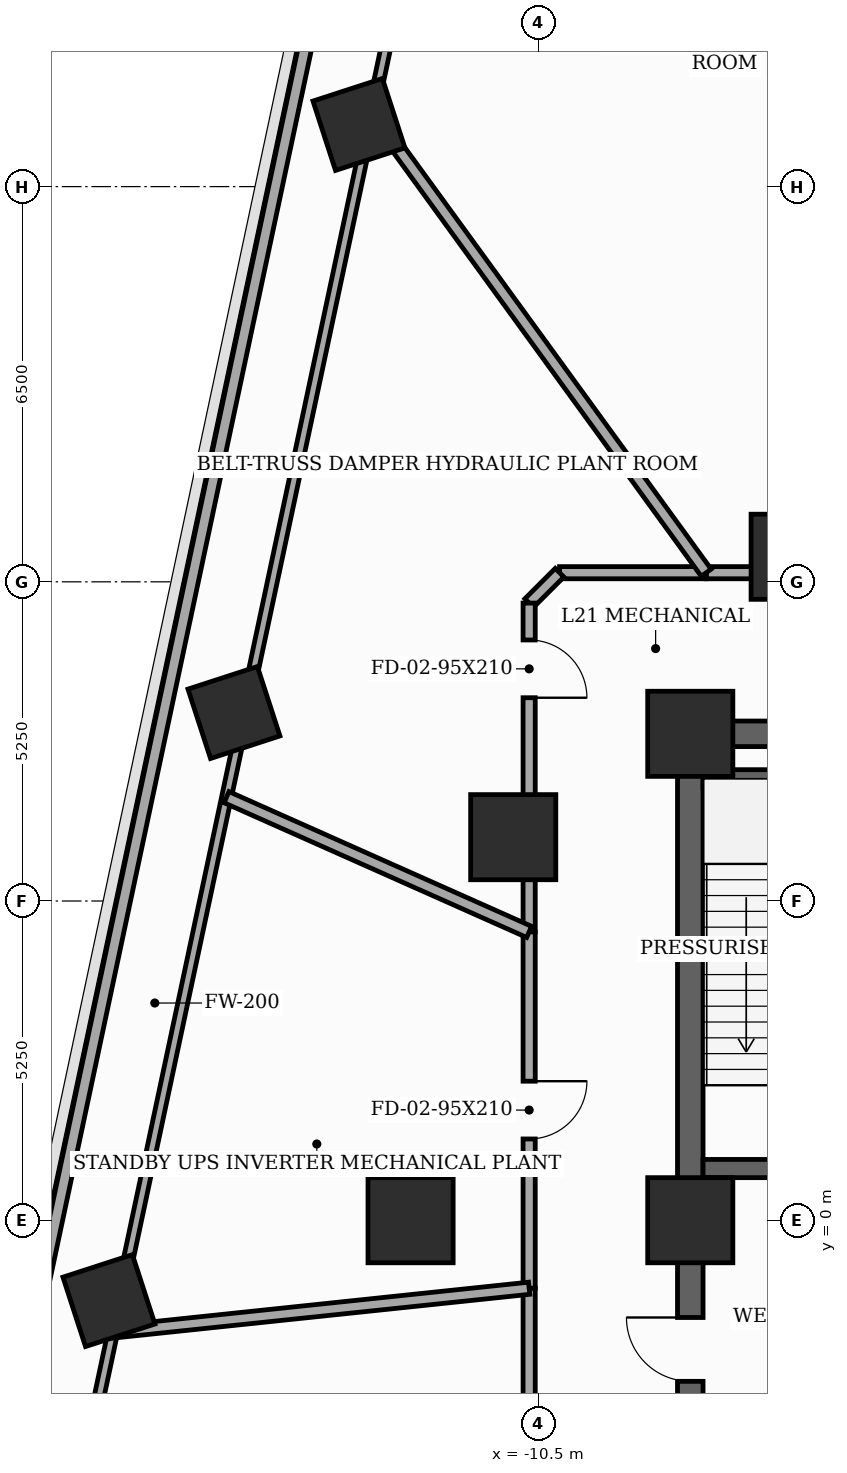
"""IFC4 building model, lengths in metres.
Left out: names, types, materials, properties, quantities, classifications, styles, units other than length and angle.
Written with IfcOpenShell. Run it as: python <this file> out.ifc"""

import sys

from ifc_helpers import new_model, si_unit, direction, frame, frame_2d, origin, origin_2d, place, context, subcontext, project, spatial, rectangle, extrude, element, fill, save


model = new_model("IFC4")
c1 = context("Model", 3, precision=1e-05, world=origin(), true_north=direction((0.0, 1.0)))
c2 = subcontext(c1, "Body", "Model", "MODEL_VIEW")
j1 = project(units=[si_unit("LENGTHUNIT", "METRE"), si_unit("PLANEANGLEUNIT", "RADIAN")], contexts=[c1])
p1 = place(None, origin())
s1 = spatial("IfcSite", under=j1, at=p1, CompositionType="ELEMENT")
p2 = place(p1, origin())
s2 = spatial("IfcBuilding", under=s1, at=p2, CompositionType="ELEMENT")
p3 = place(p2, frame((0.0, 0.0, 85.2)))
s3 = spatial("IfcBuildingStorey", under=s2, at=p3, CompositionType="ELEMENT", Elevation=85.2)
for number, where, z_axis, x_axis in (
    (1, (-8.0, 8.0, 0.0), (0.0, 0.0, 1.0), (1.0, 0.0, 0.0)),
    (2, (-8.0, 0.0, 0.0), (0.0, 0.0, 1.0), (1.0, 0.0, 0.0)),
    (3, (-6.3, 10.912, 0.0), (0.0, 0.0, 1.0), (1.0, 0.0, 0.0)),
    (4, (-10.912, 6.3, 0.0), (0.0, 0.0, 1.0), (1.0, 0.0, 0.0)),
    (5, (-12.6, 0.0, 0.0), (0.0, 0.0, 1.0), (1.0, 0.0, 0.0)),
):
    element("IfcColumn", number, at=place(p3, frame(where, z_axis=z_axis, x_axis=x_axis)), inside=s3, PredefinedType="COLUMN", context=c2, shape_type="SweptSolid", body=[
        extrude(rectangle(XDim=1.4, YDim=1.4, at=origin_2d()), origin(), (0.0, 0.0, 1.0), 5.1),
    ])
for number, where, z_axis, x_axis in (
    (6, (-13.449, 18.022, 0.0), (0.0, 0.0, 1.0), (0.951, 0.309, 0.0)),
    (7, (-15.505, 8.35, 0.0), (0.0, 0.0, 1.0), (0.951, 0.309, 0.0)),
    (8, (-17.561, -1.322, 0.0), (0.0, 0.0, 1.0), (0.951, 0.309, 0.0)),
):
    element("IfcColumn", number, at=place(p3, frame(where, z_axis=z_axis, x_axis=x_axis)), inside=s3, PredefinedType="COLUMN", context=c2, shape_type="SweptSolid", body=[
        extrude(rectangle(XDim=1.2, YDim=1.2, at=origin_2d()), origin(), (0.0, 0.0, 1.0), 5.1),
    ])
p4 = place(p3, frame((-12.499, 27.929, 0.0), z_axis=(0.0, 0.0, 1.0), x_axis=(-0.207909723978, -0.978148018796, 0.0)))
e9 = element("IfcWall", 9, at=p4, inside=s3, PredefinedType="SOLIDWALL", context=c2, shape_type="SweptSolid", body=[
    extrude(rectangle(XDim=49.44, YDim=0.22, at=frame_2d((24.72, 0.0))), origin(), (0.0, 0.0, 1.0), 4.4),
])
p5 = place(p3, frame((-8.0, -8.0, 0.0), z_axis=(0.0, 0.0, 1.0), x_axis=(0.0, 1.0, 0.0)))
e10 = element("IfcWall", 10, at=p5, inside=s3, PredefinedType="SHEAR", context=c2, shape_type="SweptSolid", body=[
    extrude(rectangle(XDim=16.0, YDim=0.42, at=frame_2d((8.0, 0.0))), origin(), (0.0, 0.0, 1.0), 4.9),
])
p6 = place(p5, frame((0.922, 0.0, 0.0)))
e11 = element("IfcOpeningElement", 11, at=p6, cuts=e10, PredefinedType="OPENING", context=c2, shape_type="SweptSolid", body=[
    extrude(rectangle(XDim=0.85, YDim=2.02, at=frame_2d((0.425, 1.01))), frame((0.0, 0.22, 0.0), z_axis=(0.0, -1.0, 0.0), x_axis=(1.0, 0.0, 0.0)), (0.0, 0.0, 1.0), 0.44),
])
p7 = place(p5, frame((5.35, 0.0, 0.0)))
e12 = element("IfcOpeningElement", 12, at=p7, cuts=e10, PredefinedType="OPENING", context=c2, shape_type="SweptSolid", body=[
    extrude(rectangle(XDim=1.05, YDim=2.15, at=frame_2d((0.525, 1.075))), frame((0.0, 0.22, 0.0), z_axis=(0.0, -1.0, 0.0), x_axis=(1.0, 0.0, 0.0)), (0.0, 0.0, 1.0), 0.44),
])
p8 = place(p3, frame((-8.0, 8.0, 0.0), z_axis=(0.0, 0.0, 1.0), x_axis=(1.0, 0.0, 0.0)))
e13 = element("IfcWall", 13, at=p8, inside=s3, PredefinedType="SHEAR", context=c2, shape_type="SweptSolid", body=[
    extrude(rectangle(XDim=16.0, YDim=0.42, at=frame_2d((8.0, 0.0))), origin(), (0.0, 0.0, 1.0), 4.9),
])
p9 = place(p8, frame((7.1, 0.0, 0.0)))
e14 = element("IfcOpeningElement", 14, at=p9, cuts=e13, PredefinedType="OPENING", context=c2, shape_type="SweptSolid", body=[
    extrude(rectangle(XDim=1.8, YDim=2.15, at=frame_2d((0.9, 1.075))), frame((0.0, 0.22, 0.0), z_axis=(0.0, -1.0, 0.0), x_axis=(1.0, 0.0, 0.0)), (0.0, 0.0, 1.0), 0.44),
])
p10 = place(p3, frame((-7.79, 0.85, 0.0), z_axis=(0.0, 0.0, 1.0), x_axis=(1.0, 0.0, 0.0)))
e15 = element("IfcWall", 15, at=p10, inside=s3, PredefinedType="SHEAR", context=c2, shape_type="SweptSolid", body=[
    extrude(rectangle(XDim=3.34, YDim=0.3, at=frame_2d((1.67, 0.0))), origin(), (0.0, 0.0, 1.0), 4.9),
])
p11 = place(p10, frame((1.85, 0.0, 0.0)))
e16 = element("IfcOpeningElement", 16, at=p11, cuts=e15, PredefinedType="OPENING", context=c2, shape_type="SweptSolid", body=[
    extrude(rectangle(XDim=1.05, YDim=2.15, at=frame_2d((0.525, 1.075))), frame((0.0, 0.16, 0.0), z_axis=(0.0, -1.0, 0.0), x_axis=(1.0, 0.0, 0.0)), (0.0, 0.0, 1.0), 0.32),
])
p12 = place(p3, frame((-7.79, 7.26, 0.0), z_axis=(0.0, 0.0, 1.0), x_axis=(1.0, 0.0, 0.0)))
e17 = element("IfcWall", 17, at=p12, inside=s3, PredefinedType="SHEAR", context=c2, shape_type="SweptSolid", body=[
    extrude(rectangle(XDim=3.34, YDim=0.3, at=frame_2d((1.67, 0.0))), origin(), (0.0, 0.0, 1.0), 4.9),
])
p13 = place(p3, frame((-21.467, -20.518, 0.0), z_axis=(0.0, 0.0, 1.0), x_axis=(0.207911659575, 0.978147607375, 0.0)))
e18 = element("IfcWall", 18, at=p13, inside=s3, PredefinedType="SOLIDWALL", context=c2, shape_type="SweptSolid", body=[
    extrude(rectangle(XDim=49.066, YDim=0.16, at=frame_2d((24.533, 0.0))), origin(), (0.0, 0.0, 1.0), 3.485),
])
p14 = place(p3, frame((-7.036, 28.85, 0.0), z_axis=(0.0, 0.0, 1.0), x_axis=(0.743144937383, -0.669130482075, 0.0)))
e19 = element("IfcWall", 19, at=p14, inside=s3, PredefinedType="SOLIDWALL", context=c2, shape_type="SweptSolid", body=[
    extrude(rectangle(XDim=49.066, YDim=0.16, at=frame_2d((24.533, 0.0))), origin(), (0.0, 0.0, 1.0), 3.485),
])
p15 = place(p3, frame((-10.65, -1.119, 0.0), z_axis=(0.0, 0.0, 1.0), x_axis=(0.0, -1.0, 0.0)))
e20 = element("IfcWall", 20, at=p15, inside=s3, PredefinedType="SOLIDWALL", context=c2, shape_type="SweptSolid", body=[
    extrude(rectangle(XDim=6.619, YDim=0.2, at=frame_2d((3.31, 0.0))), origin(), (0.0, 0.0, 1.0), 4.285),
])
p16 = place(p15, frame((2.04, 0.0, 0.0)))
e21 = element("IfcOpeningElement", 21, at=p16, cuts=e20, PredefinedType="OPENING", context=c2, shape_type="SweptSolid", body=[
    extrude(rectangle(XDim=0.95, YDim=2.1, at=frame_2d((0.475, 1.05))), frame((0.0, 0.11, 0.0), z_axis=(0.0, -1.0, 0.0), x_axis=(1.0, 0.0, 0.0)), (0.0, 0.0, 1.0), 0.22),
])
p17 = place(p3, frame((-1.119, 10.65, 0.0), z_axis=(0.0, 0.0, 1.0), x_axis=(-1.0, 0.0, 0.0)))
e22 = element("IfcWall", 22, at=p17, inside=s3, PredefinedType="SOLIDWALL", context=c2, shape_type="SweptSolid", body=[
    extrude(rectangle(XDim=6.619, YDim=0.2, at=frame_2d((3.31, 0.0))), origin(), (0.0, 0.0, 1.0), 3.485),
])
p18 = place(p17, frame((2.04, 0.0, 0.0)))
e23 = element("IfcOpeningElement", 23, at=p18, cuts=e22, PredefinedType="OPENING", context=c2, shape_type="SweptSolid", body=[
    extrude(rectangle(XDim=0.95, YDim=2.1, at=frame_2d((0.475, 1.05))), frame((0.0, 0.11, 0.0), z_axis=(0.0, -1.0, 0.0), x_axis=(1.0, 0.0, 0.0)), (0.0, 0.0, 1.0), 0.22),
])
p19 = place(p3, frame((-7.738, 10.65, 0.0), z_axis=(0.0, 0.0, 1.0), x_axis=(-1.0, 0.0, 0.0)))
e24 = element("IfcWall", 24, at=p19, inside=s3, PredefinedType="SOLIDWALL", context=c2, shape_type="SweptSolid", body=[
    extrude(rectangle(XDim=2.412, YDim=0.2, at=frame_2d((1.206, 0.0))), origin(), (0.0, 0.0, 1.0), 4.9),
])
p20 = place(p3, frame((-10.15, 10.65, 0.0), z_axis=(0.0, 0.0, 1.0), x_axis=(-0.707106781187, -0.707106781187, 0.0)))
e25 = element("IfcWall", 25, at=p20, inside=s3, PredefinedType="SOLIDWALL", context=c2, shape_type="SweptSolid", body=[
    extrude(rectangle(XDim=0.707, YDim=0.2, at=frame_2d((0.354, 0.0))), origin(), (0.0, 0.0, 1.0), 4.9),
])
p21 = place(p3, frame((-10.65, 10.15, 0.0), z_axis=(0.0, 0.0, 1.0), x_axis=(0.0, -1.0, 0.0)))
e26 = element("IfcWall", 26, at=p21, inside=s3, PredefinedType="SOLIDWALL", context=c2, shape_type="SweptSolid", body=[
    extrude(rectangle(XDim=5.408, YDim=0.2, at=frame_2d((2.704, 0.0))), origin(), (0.0, 0.0, 1.0), 4.285),
])
p22 = place(p21, frame((0.607, 0.0, 0.0)))
e27 = element("IfcOpeningElement", 27, at=p22, cuts=e26, PredefinedType="OPENING", context=c2, shape_type="SweptSolid", body=[
    extrude(rectangle(XDim=0.95, YDim=2.1, at=frame_2d((0.475, 1.05))), frame((0.0, 0.11, 0.0), z_axis=(0.0, -1.0, 0.0), x_axis=(1.0, 0.0, 0.0)), (0.0, 0.0, 1.0), 0.22),
])
p23 = place(p3, frame((-10.65, 4.742, 0.0), z_axis=(0.0, 0.0, 1.0), x_axis=(0.0, -1.0, 0.0)))
e28 = element("IfcWall", 28, at=p23, inside=s3, PredefinedType="SOLIDWALL", context=c2, shape_type="SweptSolid", body=[
    extrude(rectangle(XDim=5.861, YDim=0.2, at=frame_2d((2.93, 0.0))), origin(), (0.0, 0.0, 1.0), 4.285),
])
p24 = place(p23, frame((2.456, 0.0, 0.0)))
e29 = element("IfcOpeningElement", 29, at=p24, cuts=e28, PredefinedType="OPENING", context=c2, shape_type="SweptSolid", body=[
    extrude(rectangle(XDim=0.95, YDim=2.1, at=frame_2d((0.475, 1.05))), frame((0.0, 0.11, 0.0), z_axis=(0.0, -1.0, 0.0), x_axis=(1.0, 0.0, 0.0)), (0.0, 0.0, 1.0), 0.22),
])
p25 = place(p3, frame((-10.65, -1.119, 0.0), z_axis=(0.0, 0.0, 1.0), x_axis=(-0.994513610577, -0.104607257762, 0.0)))
e30 = element("IfcWall", 30, at=p25, inside=s3, PredefinedType="SOLIDWALL", context=c2, shape_type="SweptSolid", body=[
    extrude(rectangle(XDim=6.885, YDim=0.2, at=frame_2d((3.442, 0.0))), origin(), (0.0, 0.0, 1.0), 3.485),
])
p26 = place(p3, frame((-13.234, 18.215, 0.0), z_axis=(0.0, 0.0, 1.0), x_axis=(0.587761784222, -0.809034044406, 0.0)))
e31 = element("IfcWall", 31, at=p26, inside=s3, PredefinedType="SOLIDWALL", context=c2, shape_type="SweptSolid", body=[
    extrude(rectangle(XDim=9.351, YDim=0.2, at=frame_2d((4.675, 0.0))), origin(), (0.0, 0.0, 1.0), 3.485),
])
p27 = place(p3, frame((-15.627, 6.958, 0.0), z_axis=(0.0, 0.0, 1.0), x_axis=(0.913535999343, -0.4067578861, 0.0)))
e32 = element("IfcWall", 32, at=p27, inside=s3, PredefinedType="SOLIDWALL", context=c2, shape_type="SweptSolid", body=[
    extrude(rectangle(XDim=5.448, YDim=0.2, at=frame_2d((2.724, 0.0))), origin(), (0.0, 0.0, 1.0), 3.485),
])
p28 = place(p7, origin())
e33 = element("IfcDoor", 33, at=p28, inside=s3, OperationType="SINGLE_SWING_RIGHT", PredefinedType="DOOR", context=c2, shape_type="SweptSolid", body=[
    extrude(rectangle(XDim=1.05, YDim=2.15, at=frame_2d((0.525, 1.075))), frame((0.0, 0.025, 0.0), z_axis=(0.0, -1.0, 0.0), x_axis=(1.0, 0.0, 0.0)), (0.0, 0.0, 1.0), 0.05),
])
fill(e12, e33)
p29 = place(p22, origin())
e34 = element("IfcDoor", 34, at=p29, inside=s3, OperationType="SINGLE_SWING_RIGHT", PredefinedType="DOOR", context=c2, shape_type="SweptSolid", body=[
    extrude(rectangle(XDim=0.95, YDim=2.1, at=frame_2d((0.475, 1.05))), frame((0.0, 0.025, 0.0), z_axis=(0.0, -1.0, 0.0), x_axis=(1.0, 0.0, 0.0)), (0.0, 0.0, 1.0), 0.05),
])
fill(e27, e34)
p30 = place(p24, origin())
e35 = element("IfcDoor", 35, at=p30, inside=s3, OperationType="SINGLE_SWING_LEFT", PredefinedType="DOOR", context=c2, shape_type="SweptSolid", body=[
    extrude(rectangle(XDim=0.95, YDim=2.1, at=frame_2d((0.475, 1.05))), frame((0.0, 0.025, 0.0), z_axis=(0.0, -1.0, 0.0), x_axis=(1.0, 0.0, 0.0)), (0.0, 0.0, 1.0), 0.05),
])
fill(e29, e35)
save(model, sys.argv[1])
